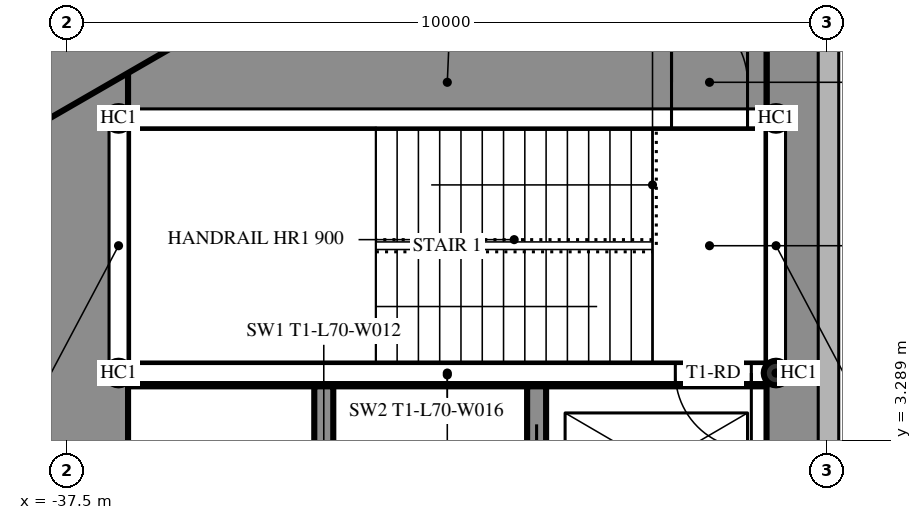
"""IFC4 building model, lengths in metres.
Left out: names, types, materials, properties, quantities, classifications, styles, units other than length and angle.
Written with IfcOpenShell. Run it as: python <this file> out.ifc"""

import sys

from ifc_helpers import new_model, si_unit, direction, frame, frame_2d, origin, origin_2d, place, context, subcontext, project, spatial, rectangle, hollow_circle, extrude, element, fill, save


model = new_model("IFC4")
c1 = context("Model", 3, precision=1e-05, world=origin(), true_north=direction((0.0, 1.0)))
c2 = subcontext(c1, "Body", "Model", "MODEL_VIEW")
j1 = project(units=[si_unit("LENGTHUNIT", "METRE"), si_unit("PLANEANGLEUNIT", "RADIAN")], contexts=[c1])
p1 = place(None, origin())
s1 = spatial("IfcSite", under=j1, at=p1, CompositionType="ELEMENT")
p2 = place(p1, origin())
s2 = spatial("IfcBuilding", under=s1, at=p2, CompositionType="ELEMENT")
p3 = place(p2, frame((0.0, 0.0, 268.3)))
s3 = spatial("IfcBuildingStorey", under=s2, at=p3, CompositionType="ELEMENT", Elevation=268.3)
p4 = place(p3, frame((-27.9, 8.6, 0.0), z_axis=(0.0, 0.0, 1.0), x_axis=(0.0, -1.0, 0.0)))
e1 = element("IfcWall", 1, at=p4, inside=s3, PredefinedType="SHEAR", context=c2, shape_type="SweptSolid", body=[
    extrude(rectangle(XDim=17.2, YDim=0.8, at=frame_2d((8.6, 0.0))), origin(), (0.0, 0.0, 1.0), 5.0),
])
p5 = place(p4, frame((6.95, 0.0, 0.0)))
e2 = element("IfcOpeningElement", 2, at=p5, cuts=e1, PredefinedType="OPENING", context=c2, shape_type="SweptSolid", body=[
    extrude(rectangle(XDim=0.9, YDim=2.2, at=frame_2d((0.45, 1.1))), frame((0.0, 0.41, 0.0), z_axis=(0.0, -1.0, 0.0), x_axis=(1.0, 0.0, 0.0)), (0.0, 0.0, 1.0), 0.82),
])
p6 = place(p3, frame((-37.3, 8.6, 0.0), z_axis=(0.0, 0.0, 1.0), x_axis=(0.0, -1.0, 0.0)))
e3 = element("IfcWall", 3, at=p6, inside=s3, PredefinedType="SHEAR", context=c2, shape_type="SweptSolid", body=[
    extrude(rectangle(XDim=17.2, YDim=1.2, at=frame_2d((8.6, 0.0))), origin(), (0.0, 0.0, 1.0), 5.0),
])
p7 = place(p6, frame((7.7, 0.0, 0.0)))
e4 = element("IfcOpeningElement", 4, at=p7, cuts=e3, PredefinedType="OPENING", context=c2, shape_type="SweptSolid", body=[
    extrude(rectangle(XDim=1.8, YDim=2.2, at=frame_2d((0.9, 1.1))), frame((0.0, 0.61, 0.0), z_axis=(0.0, -1.0, 0.0), x_axis=(1.0, 0.0, 0.0)), (0.0, 0.0, 1.0), 1.22),
])
p8 = place(p3, frame((-28.3, 8.0, 0.0), z_axis=(0.0, 0.0, 1.0), x_axis=(-1.0, 0.0, 0.0)))
e5 = element("IfcWall", 5, at=p8, inside=s3, PredefinedType="SHEAR", context=c2, shape_type="SweptSolid", body=[
    extrude(rectangle(XDim=8.4, YDim=1.2, at=frame_2d((4.2, 0.0))), origin(), (0.0, 0.0, 1.0), 5.0),
])
p9 = place(p8, frame((0.25, 0.0, 0.0)))
e6 = element("IfcOpeningElement", 6, at=p9, cuts=e5, PredefinedType="OPENING", context=c2, shape_type="SweptSolid", body=[
    extrude(rectangle(XDim=1.0, YDim=2.2, at=frame_2d((0.5, 1.1))), frame((0.0, 0.61, 0.0), z_axis=(0.0, -1.0, 0.0), x_axis=(1.0, 0.0, 0.0)), (0.0, 0.0, 1.0), 1.22),
])
p10 = place(p3, frame((-28.3, 4.15, 0.0), z_axis=(0.0, 0.0, 1.0), x_axis=(-1.0, 0.0, 0.0)))
e7 = element("IfcWall", 7, at=p10, inside=s3, PredefinedType="SHEAR", context=c2, shape_type="SweptSolid", body=[
    extrude(rectangle(XDim=8.4, YDim=0.3, at=frame_2d((4.2, 0.0))), origin(), (0.0, 0.0, 1.0), 5.0),
])
p11 = place(p3, frame((-31.325, 4.0, 0.0), z_axis=(0.0, 0.0, 1.0), x_axis=(0.0, -1.0, 0.0)))
e8 = element("IfcWall", 8, at=p11, inside=s3, PredefinedType="SHEAR", context=c2, shape_type="SweptSolid", body=[
    extrude(rectangle(XDim=2.1, YDim=0.25, at=frame_2d((1.05, 0.0))), origin(), (0.0, 0.0, 1.0), 5.0),
])
p12 = place(p11, frame((0.5, 0.0, 0.0)))
e9 = element("IfcOpeningElement", 9, at=p12, cuts=e8, PredefinedType="OPENING", context=c2, shape_type="SweptSolid", body=[
    extrude(rectangle(XDim=1.1, YDim=2.2, at=frame_2d((0.55, 1.1))), frame((0.0, 0.135, 0.0), z_axis=(0.0, -1.0, 0.0), x_axis=(1.0, 0.0, 0.0)), (0.0, 0.0, 1.0), 0.27),
])
p13 = place(p3, frame((-34.125, 4.0, 0.0), z_axis=(0.0, 0.0, 1.0), x_axis=(0.0, -1.0, 0.0)))
e10 = element("IfcWall", 10, at=p13, inside=s3, PredefinedType="SHEAR", context=c2, shape_type="SweptSolid", body=[
    extrude(rectangle(XDim=2.35, YDim=0.25, at=frame_2d((1.175, 0.0))), origin(), (0.0, 0.0, 1.0), 5.0),
])
p14 = place(p3, frame((-27.2, 14.3, 0.0), z_axis=(0.0, 0.0, 1.0), x_axis=(-0.866026593062, -0.499997940104, 0.0)))
e11 = element("IfcWall", 11, at=p14, inside=s3, PredefinedType="SHEAR", context=c2, shape_type="SweptSolid", body=[
    extrude(rectangle(XDim=28.946, YDim=1.2, at=frame_2d((14.473, 0.0))), origin(), (0.0, 0.0, 1.0), 5.0),
])
p15 = place(p14, frame((4.6, 0.0, 0.0)))
e12 = element("IfcOpeningElement", 12, at=p15, cuts=e11, PredefinedType="OPENING", context=c2, shape_type="SweptSolid", body=[
    extrude(rectangle(XDim=1.0, YDim=2.2, at=frame_2d((0.5, 1.1))), frame((0.0, 0.61, 0.0), z_axis=(0.0, -1.0, 0.0), x_axis=(1.0, 0.0, 0.0)), (0.0, 0.0, 1.0), 1.22),
])
p16 = place(p14, frame((13.395, 0.0, 0.0)))
e13 = element("IfcOpeningElement", 13, at=p16, cuts=e11, PredefinedType="OPENING", context=c2, shape_type="SweptSolid", body=[
    extrude(rectangle(XDim=1.8, YDim=2.2, at=frame_2d((0.9, 1.1))), frame((0.0, 0.61, 0.0), z_axis=(0.0, -1.0, 0.0), x_axis=(1.0, 0.0, 0.0)), (0.0, 0.0, 1.0), 1.22),
])
for number, where, z_axis, x_axis in (
    (14, (-28.175, 7.525, 5.0), (0.0, 0.0, 1.0), (1.0, 0.0, 0.0)),
    (15, (-36.825, 7.525, 5.0), (0.0, 0.0, 1.0), (1.0, 0.0, 0.0)),
    (16, (-28.175, 4.175, 5.0), (0.0, 0.0, 1.0), (1.0, 0.0, 0.0)),
    (17, (-36.825, 4.175, 5.0), (0.0, 0.0, 1.0), (1.0, 0.0, 0.0)),
):
    element("IfcColumn", number, at=place(p3, frame(where, z_axis=z_axis, x_axis=x_axis)), inside=s3, PredefinedType="COLUMN", context=c2, shape_type="SweptSolid", body=[
        extrude(hollow_circle(Radius=0.162, WallThickness=0.012, at=origin_2d()), origin(), (0.0, 0.0, 1.0), 3.0),
    ])
for number, where, z_axis, x_axis in (
    (18, (-28.175, 7.422, 5.0), (0.0, 0.0, 1.0), (0.0, -1.0, 0.0)),
    (19, (-36.825, 7.422, 5.0), (0.0, 0.0, 1.0), (0.0, -1.0, 0.0)),
):
    element("IfcWall", number, at=place(p3, frame(where, z_axis=z_axis, x_axis=x_axis)), inside=s3, PredefinedType="SOLIDWALL", context=c2, shape_type="SweptSolid", body=[
        extrude(rectangle(XDim=3.144, YDim=0.25, at=frame_2d((1.572, 0.0))), origin(), (0.0, 0.0, 1.0), 2.54),
    ])
p17 = place(p3, frame((-28.278, 7.525, 5.0), z_axis=(0.0, 0.0, 1.0), x_axis=(-1.0, 0.0, 0.0)))
e20 = element("IfcWall", 20, at=p17, inside=s3, PredefinedType="SOLIDWALL", context=c2, shape_type="SweptSolid", body=[
    extrude(rectangle(XDim=8.444, YDim=0.25, at=frame_2d((4.222, 0.0))), origin(), (0.0, 0.0, 1.0), 2.54),
])
p18 = place(p3, frame((-28.278, 4.175, 5.0), z_axis=(0.0, 0.0, 1.0), x_axis=(-1.0, 0.0, 0.0)))
e21 = element("IfcWall", 21, at=p18, inside=s3, PredefinedType="SOLIDWALL", context=c2, shape_type="SweptSolid", body=[
    extrude(rectangle(XDim=8.444, YDim=0.25, at=frame_2d((4.222, 0.0))), origin(), (0.0, 0.0, 1.0), 2.54),
])
p19 = place(p18, frame((0.222, 0.0, 0.0)))
e22 = element("IfcOpeningElement", 22, at=p19, cuts=e21, PredefinedType="OPENING", context=c2, shape_type="SweptSolid", body=[
    extrude(rectangle(XDim=1.0, YDim=2.2, at=frame_2d((0.5, 1.1))), frame((0.0, 0.135, 0.0), z_axis=(0.0, -1.0, 0.0), x_axis=(1.0, 0.0, 0.0)), (0.0, 0.0, 1.0), 0.27),
])
p20 = place(p3, frame((-28.737, 16.068, 0.0), z_axis=(0.0, 0.0, 1.0), x_axis=(-0.866026057212, -0.499998868229, 0.0)))
e23 = element("IfcWall", 23, at=p20, inside=s3, PredefinedType="PARTITIONING", context=c2, shape_type="SweptSolid", body=[
    extrude(rectangle(XDim=32.137, YDim=0.2, at=frame_2d((16.068, 0.0))), origin(), (0.0, 0.0, 1.0), 4.7),
])
p21 = place(p20, frame((7.134, 0.0, 0.0)))
e24 = element("IfcOpeningElement", 24, at=p21, cuts=e23, PredefinedType="OPENING", context=c2, shape_type="SweptSolid", body=[
    extrude(rectangle(XDim=2.0, YDim=2.4, at=frame_2d((1.0, 1.2))), frame((0.0, 0.11, 0.0), z_axis=(0.0, -1.0, 0.0), x_axis=(1.0, 0.0, 0.0)), (0.0, 0.0, 1.0), 0.22),
])
p22 = place(p20, frame((17.117, 0.0, 0.0)))
e25 = element("IfcOpeningElement", 25, at=p22, cuts=e23, PredefinedType="OPENING", context=c2, shape_type="SweptSolid", body=[
    extrude(rectangle(XDim=2.0, YDim=2.4, at=frame_2d((1.0, 1.2))), frame((0.0, 0.11, 0.0), z_axis=(0.0, -1.0, 0.0), x_axis=(1.0, 0.0, 0.0)), (0.0, 0.0, 1.0), 0.22),
])
p23 = place(p20, frame((21.266, 0.0, 0.0)))
e26 = element("IfcOpeningElement", 26, at=p23, cuts=e23, PredefinedType="OPENING", context=c2, shape_type="SweptSolid", body=[
    extrude(rectangle(XDim=2.0, YDim=2.4, at=frame_2d((1.0, 1.2))), frame((0.0, 0.11, 0.0), z_axis=(0.0, -1.0, 0.0), x_axis=(1.0, 0.0, 0.0)), (0.0, 0.0, 1.0), 0.22),
])
p24 = place(p20, frame((27.126, 0.0, 0.0)))
e27 = element("IfcOpeningElement", 27, at=p24, cuts=e23, PredefinedType="OPENING", context=c2, shape_type="SweptSolid", body=[
    extrude(rectangle(XDim=2.0, YDim=2.4, at=frame_2d((1.0, 1.2))), frame((0.0, 0.11, 0.0), z_axis=(0.0, -1.0, 0.0), x_axis=(1.0, 0.0, 0.0)), (0.0, 0.0, 1.0), 0.22),
])
p25 = place(p19, origin())
e28 = element("IfcDoor", 28, at=p25, inside=s3, OperationType="SINGLE_SWING_LEFT", PredefinedType="DOOR", context=c2, shape_type="SweptSolid", body=[
    extrude(rectangle(XDim=1.0, YDim=2.2, at=frame_2d((0.5, 1.1))), frame((0.0, 0.025, 0.0), z_axis=(0.0, -1.0, 0.0), x_axis=(1.0, 0.0, 0.0)), (0.0, 0.0, 1.0), 0.05),
])
fill(e22, e28)
p26 = place(p9, origin())
e29 = element("IfcDoor", 29, at=p26, inside=s3, OperationType="SINGLE_SWING_RIGHT", PredefinedType="DOOR", context=c2, shape_type="SweptSolid", body=[
    extrude(rectangle(XDim=1.0, YDim=2.2, at=frame_2d((0.5, 1.1))), frame((0.0, 0.025, 0.0), z_axis=(0.0, -1.0, 0.0), x_axis=(1.0, 0.0, 0.0)), (0.0, 0.0, 1.0), 0.05),
])
fill(e6, e29)
p27 = place(p12, origin())
e30 = element("IfcDoor", 30, at=p27, inside=s3, OperationType="SLIDING_TO_LEFT", PredefinedType="USERDEFINED", context=c2, shape_type="SweptSolid", body=[
    extrude(rectangle(XDim=1.1, YDim=2.2, at=frame_2d((0.55, 1.1))), frame((0.0, 0.025, 0.0), z_axis=(0.0, -1.0, 0.0), x_axis=(1.0, 0.0, 0.0)), (0.0, 0.0, 1.0), 0.05),
])
fill(e9, e30)
save(model, sys.argv[1])
